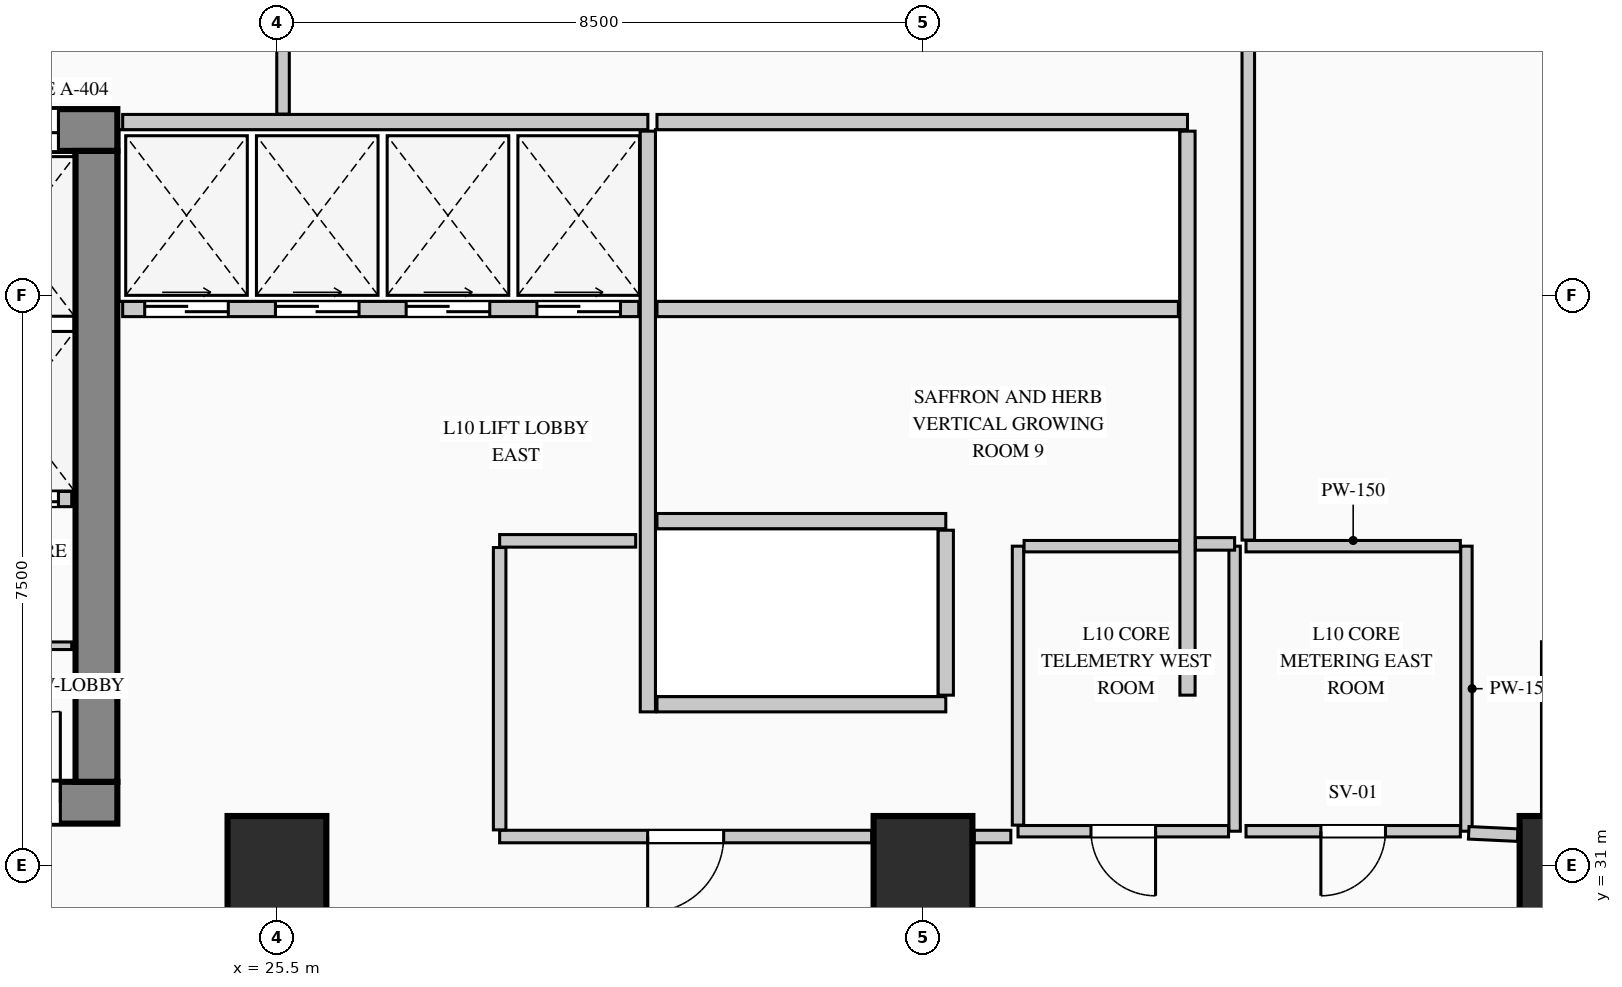
"""IFC4 building model, lengths in metres.
Left out: names, types, materials, properties, quantities, classifications, styles, units other than length and angle.
Written with IfcOpenShell. Run it as: python <this file> out.ifc"""

import sys

from ifc_helpers import new_model, si_unit, direction, frame, frame_2d, origin, origin_2d, place, context, subcontext, project, spatial, rectangle, extrude, element, fill, save


model = new_model("IFC4")
c1 = context("Model", 3, precision=1e-05, world=origin(), true_north=direction((0.0, 1.0)))
c2 = subcontext(c1, "Body", "Model", "MODEL_VIEW")
j1 = project(units=[si_unit("LENGTHUNIT", "METRE"), si_unit("PLANEANGLEUNIT", "RADIAN")], contexts=[c1])
p1 = place(None, origin())
s1 = spatial("IfcSite", under=j1, at=p1, CompositionType="ELEMENT")
p2 = place(p1, origin())
s2 = spatial("IfcBuilding", under=s1, at=p2, CompositionType="ELEMENT")
p3 = place(p2, frame((0.0, 0.0, 44.6)))
s3 = spatial("IfcBuildingStorey", under=s2, at=p3, CompositionType="ELEMENT", Elevation=44.6)
p4 = place(p3, frame((5.45, 40.675, 0.0), z_axis=(0.0, 0.0, 1.0), x_axis=(1.0, 0.0, 0.0)))
e1 = element("IfcWall", 1, at=p4, inside=s3, PredefinedType="SHEAR", context=c2, shape_type="SweptSolid", body=[
    extrude(rectangle(XDim=17.95, YDim=0.55, at=frame_2d((8.975, 0.0))), origin(), (0.0, 0.0, 1.0), 4.4),
])
p5 = place(p4, frame((15.995, 0.0, 0.0)))
e2 = element("IfcOpeningElement", 2, at=p5, cuts=e1, PredefinedType="OPENING", context=c2, shape_type="SweptSolid", body=[
    extrude(rectangle(XDim=1.18, YDim=2.25, at=frame_2d((0.59, 1.125))), frame((0.0, 0.285, 0.0), z_axis=(0.0, -1.0, 0.0), x_axis=(1.0, 0.0, 0.0)), (0.0, 0.0, 1.0), 0.57),
])
p6 = place(p3, frame((5.45, 31.825, 0.0), z_axis=(0.0, 0.0, 1.0), x_axis=(1.0, 0.0, 0.0)))
e3 = element("IfcWall", 3, at=p6, inside=s3, PredefinedType="SHEAR", context=c2, shape_type="SweptSolid", body=[
    extrude(rectangle(XDim=17.95, YDim=0.55, at=frame_2d((8.975, 0.0))), origin(), (0.0, 0.0, 1.0), 4.4),
])
p7 = place(p6, frame((3.2, 0.0, 0.0)))
e4 = element("IfcOpeningElement", 4, at=p7, cuts=e3, PredefinedType="OPENING", context=c2, shape_type="SweptSolid", body=[
    extrude(rectangle(XDim=1.2, YDim=2.2, at=frame_2d((0.6, 1.1))), frame((0.0, 0.285, 0.0), z_axis=(0.0, -1.0, 0.0), x_axis=(1.0, 0.0, 0.0)), (0.0, 0.0, 1.0), 0.57),
])
p8 = place(p6, frame((7.05, 0.0, 0.0)))
e5 = element("IfcOpeningElement", 5, at=p8, cuts=e3, PredefinedType="OPENING", context=c2, shape_type="SweptSolid", body=[
    extrude(rectangle(XDim=1.2, YDim=2.2, at=frame_2d((0.6, 1.1))), frame((0.0, 0.285, 0.0), z_axis=(0.0, -1.0, 0.0), x_axis=(1.0, 0.0, 0.0)), (0.0, 0.0, 1.0), 0.57),
])
p9 = place(p6, frame((8.9, 0.0, 0.0)))
e6 = element("IfcOpeningElement", 6, at=p9, cuts=e3, PredefinedType="OPENING", context=c2, shape_type="SweptSolid", body=[
    extrude(rectangle(XDim=1.15, YDim=2.2, at=frame_2d((0.575, 1.1))), frame((0.0, 0.285, 0.0), z_axis=(0.0, -1.0, 0.0), x_axis=(1.0, 0.0, 0.0)), (0.0, 0.0, 1.0), 0.57),
])
p10 = place(p6, frame((16.0, 0.0, 0.0)))
e7 = element("IfcOpeningElement", 7, at=p10, cuts=e3, PredefinedType="OPENING", context=c2, shape_type="SweptSolid", body=[
    extrude(rectangle(XDim=1.2, YDim=2.2, at=frame_2d((0.6, 1.1))), frame((0.0, 0.285, 0.0), z_axis=(0.0, -1.0, 0.0), x_axis=(1.0, 0.0, 0.0)), (0.0, 0.0, 1.0), 0.57),
])
p11 = place(p3, frame((23.125, 32.1, 0.0), z_axis=(0.0, 0.0, 1.0), x_axis=(0.0, 1.0, 0.0)))
e8 = element("IfcWall", 8, at=p11, inside=s3, PredefinedType="SHEAR", context=c2, shape_type="SweptSolid", body=[
    extrude(rectangle(XDim=8.3, YDim=0.55, at=frame_2d((4.15, 0.0))), origin(), (0.0, 0.0, 1.0), 4.4),
])
for number, where, z_axis, x_axis in (
    (9, (25.5, 31.0, 0.0), (0.0, 0.0, 1.0), (1.0, 0.0, 0.0)),
    (10, (34.0, 31.0, 0.0), (0.0, 0.0, 1.0), (1.0, 0.0, 0.0)),
    (11, (42.5, 31.0, 0.0), (0.0, 0.0, 1.0), (1.0, 0.0, 0.0)),
):
    element("IfcColumn", number, at=place(p3, frame(where, z_axis=z_axis, x_axis=x_axis)), inside=s3, PredefinedType="COLUMN", context=c2, shape_type="SweptSolid", body=[
        extrude(rectangle(XDim=1.3, YDim=1.3, at=origin_2d()), origin(), (0.0, 0.0, 1.0), 4.4),
    ])
p12 = place(p3, frame((21.38, 33.89, 0.0), z_axis=(0.0, 0.0, 1.0), x_axis=(1.0, 0.0, 0.0)))
e12 = element("IfcWall", 12, at=p12, inside=s3, PredefinedType="PARTITIONING", context=c2, shape_type="SweptSolid", body=[
    extrude(rectangle(XDim=1.42, YDim=0.1, at=frame_2d((0.71, 0.0))), origin(), (0.0, 0.0, 1.0), 4.1),
])
p13 = place(p12, frame((0.28, 0.0, 0.0)))
e13 = element("IfcOpeningElement", 13, at=p13, cuts=e12, PredefinedType="OPENING", context=c2, shape_type="SweptSolid", body=[
    extrude(rectangle(XDim=0.85, YDim=2.1, at=frame_2d((0.425, 1.05))), frame((0.0, 0.06, 0.0), z_axis=(0.0, -1.0, 0.0), x_axis=(1.0, 0.0, 0.0)), (0.0, 0.0, 1.0), 0.12),
])
p14 = place(p3, frame((21.3, 35.82, 0.0), z_axis=(0.0, 0.0, 1.0), x_axis=(1.0, 0.0, 0.0)))
e14 = element("IfcWall", 14, at=p14, inside=s3, PredefinedType="PARTITIONING", context=c2, shape_type="SweptSolid", body=[
    extrude(rectangle(XDim=1.5, YDim=0.2, at=frame_2d((0.75, 0.0))), origin(), (0.0, 0.0, 1.0), 4.1),
])
p15 = place(p14, frame((0.145, 0.0, 0.0)))
e15 = element("IfcOpeningElement", 15, at=p15, cuts=e14, PredefinedType="OPENING", context=c2, shape_type="SweptSolid", body=[
    extrude(rectangle(XDim=1.18, YDim=2.25, at=frame_2d((0.59, 1.125))), frame((0.0, 0.11, 0.0), z_axis=(0.0, -1.0, 0.0), x_axis=(1.0, 0.0, 0.0)), (0.0, 0.0, 1.0), 0.22),
])
p16 = place(p3, frame((23.47, 40.78, 0.0), z_axis=(0.0, 0.0, 1.0), x_axis=(1.0, 0.0, 0.0)))
e16 = element("IfcWall", 16, at=p16, inside=s3, PredefinedType="PARTITIONING", context=c2, shape_type="SweptSolid", body=[
    extrude(rectangle(XDim=6.91, YDim=0.2, at=frame_2d((3.455, 0.0))), origin(), (0.0, 0.0, 1.0), 4.1),
])
p17 = place(p3, frame((30.38, 33.02, 0.0), z_axis=(0.0, 0.0, 1.0), x_axis=(0.0, 1.0, 0.0)))
e17 = element("IfcWall", 17, at=p17, inside=s3, PredefinedType="PARTITIONING", context=c2, shape_type="SweptSolid", body=[
    extrude(rectangle(XDim=7.64, YDim=0.2, at=frame_2d((3.82, 0.0))), origin(), (0.0, 0.0, 1.0), 4.1),
])
p18 = place(p3, frame((23.47, 38.32, 0.0), z_axis=(0.0, 0.0, 1.0), x_axis=(1.0, 0.0, 0.0)))
e18 = element("IfcWall", 18, at=p18, inside=s3, PredefinedType="PARTITIONING", context=c2, shape_type="SweptSolid", body=[
    extrude(rectangle(XDim=6.79, YDim=0.2, at=frame_2d((3.395, 0.0))), origin(), (0.0, 0.0, 1.0), 4.1),
])
p19 = place(p18, frame((0.29, 0.0, 0.0)))
e19 = element("IfcOpeningElement", 19, at=p19, cuts=e18, PredefinedType="OPENING", context=c2, shape_type="SweptSolid", body=[
    extrude(rectangle(XDim=1.1, YDim=2.2, at=frame_2d((0.55, 1.1))), frame((0.0, 0.11, 0.0), z_axis=(0.0, -1.0, 0.0), x_axis=(1.0, 0.0, 0.0)), (0.0, 0.0, 1.0), 0.22),
])
p20 = place(p18, frame((2.01, 0.0, 0.0)))
e20 = element("IfcOpeningElement", 20, at=p20, cuts=e18, PredefinedType="OPENING", context=c2, shape_type="SweptSolid", body=[
    extrude(rectangle(XDim=1.1, YDim=2.2, at=frame_2d((0.55, 1.1))), frame((0.0, 0.11, 0.0), z_axis=(0.0, -1.0, 0.0), x_axis=(1.0, 0.0, 0.0)), (0.0, 0.0, 1.0), 0.22),
])
p21 = place(p18, frame((3.73, 0.0, 0.0)))
e21 = element("IfcOpeningElement", 21, at=p21, cuts=e18, PredefinedType="OPENING", context=c2, shape_type="SweptSolid", body=[
    extrude(rectangle(XDim=1.1, YDim=2.2, at=frame_2d((0.55, 1.1))), frame((0.0, 0.11, 0.0), z_axis=(0.0, -1.0, 0.0), x_axis=(1.0, 0.0, 0.0)), (0.0, 0.0, 1.0), 0.22),
])
p22 = place(p18, frame((5.45, 0.0, 0.0)))
e22 = element("IfcOpeningElement", 22, at=p22, cuts=e18, PredefinedType="OPENING", context=c2, shape_type="SweptSolid", body=[
    extrude(rectangle(XDim=1.1, YDim=2.2, at=frame_2d((0.55, 1.1))), frame((0.0, 0.11, 0.0), z_axis=(0.0, -1.0, 0.0), x_axis=(1.0, 0.0, 0.0)), (0.0, 0.0, 1.0), 0.22),
])
p23 = place(p3, frame((30.5, 40.78, 0.0), z_axis=(0.0, 0.0, 1.0), x_axis=(1.0, 0.0, 0.0)))
e23 = element("IfcWall", 23, at=p23, inside=s3, PredefinedType="PARTITIONING", context=c2, shape_type="SweptSolid", body=[
    extrude(rectangle(XDim=6.98, YDim=0.2, at=frame_2d((3.49, 0.0))), origin(), (0.0, 0.0, 1.0), 4.1),
])
p24 = place(p3, frame((37.48, 33.24, 0.0), z_axis=(0.0, 0.0, 1.0), x_axis=(0.0, 1.0, 0.0)))
e24 = element("IfcWall", 24, at=p24, inside=s3, PredefinedType="PARTITIONING", context=c2, shape_type="SweptSolid", body=[
    extrude(rectangle(XDim=7.42, YDim=0.2, at=frame_2d((3.71, 0.0))), origin(), (0.0, 0.0, 1.0), 4.1),
])
p25 = place(p3, frame((30.5, 38.32, 0.0), z_axis=(0.0, 0.0, 1.0), x_axis=(1.0, 0.0, 0.0)))
e25 = element("IfcWall", 25, at=p25, inside=s3, PredefinedType="PARTITIONING", context=c2, shape_type="SweptSolid", body=[
    extrude(rectangle(XDim=6.86, YDim=0.2, at=frame_2d((3.43, 0.0))), origin(), (0.0, 0.0, 1.0), 4.1),
])
for number, where, z_axis, x_axis in (
    (26, (30.5, 35.53, 0.0), (0.0, 0.0, 1.0), (1.0, 0.0, 0.0)),
    (27, (30.5, 33.12, 0.0), (0.0, 0.0, 1.0), (1.0, 0.0, 0.0)),
):
    element("IfcWall", number, at=place(p3, frame(where, z_axis=z_axis, x_axis=x_axis)), inside=s3, PredefinedType="PARTITIONING", context=c2, shape_type="SweptSolid", body=[
        extrude(rectangle(XDim=3.8, YDim=0.2, at=frame_2d((1.9, 0.0))), origin(), (0.0, 0.0, 1.0), 4.1),
    ])
p26 = place(p3, frame((34.3, 33.24, 0.0), z_axis=(0.0, 0.0, 1.0), x_axis=(0.0, 1.0, 0.0)))
e28 = element("IfcWall", 28, at=p26, inside=s3, PredefinedType="PARTITIONING", context=c2, shape_type="SweptSolid", body=[
    extrude(rectangle(XDim=2.17, YDim=0.2, at=frame_2d((1.085, 0.0))), origin(), (0.0, 0.0, 1.0), 4.1),
])
p27 = place(p3, frame((38.1, 35.2, 0.0), z_axis=(0.0, 0.0, 1.0), x_axis=(0.0, -1.0, 0.0)))
e29 = element("IfcWall", 29, at=p27, inside=s3, PredefinedType="PARTITIONING", context=c2, shape_type="SweptSolid", body=[
    extrude(rectangle(XDim=3.75, YDim=0.15, at=frame_2d((1.875, 0.0))), origin(), (0.0, 0.0, 1.0), 4.1),
])
p28 = place(p3, frame((38.02, 31.45, 0.0), z_axis=(0.0, 0.0, 1.0), x_axis=(-1.0, 0.0, 0.0)))
e30 = element("IfcWall", 30, at=p28, inside=s3, PredefinedType="PARTITIONING", context=c2, shape_type="SweptSolid", body=[
    extrude(rectangle(XDim=2.77, YDim=0.15, at=frame_2d((1.385, 0.0))), origin(), (0.0, 0.0, 1.0), 4.1),
])
p29 = place(p28, frame((0.96, 0.0, 0.0)))
e31 = element("IfcOpeningElement", 31, at=p29, cuts=e30, PredefinedType="OPENING", context=c2, shape_type="SweptSolid", body=[
    extrude(rectangle(XDim=0.85, YDim=2.1, at=frame_2d((0.425, 1.05))), frame((0.0, 0.085, 0.0), z_axis=(0.0, -1.0, 0.0), x_axis=(1.0, 0.0, 0.0)), (0.0, 0.0, 1.0), 0.17),
])
p30 = place(p3, frame((35.25, 31.53, 0.0), z_axis=(0.0, 0.0, 1.0), x_axis=(0.0, 1.0, 0.0)))
e32 = element("IfcWall", 32, at=p30, inside=s3, PredefinedType="PARTITIONING", context=c2, shape_type="SweptSolid", body=[
    extrude(rectangle(XDim=3.67, YDim=0.15, at=frame_2d((1.835, 0.0))), origin(), (0.0, 0.0, 1.0), 4.1),
])
p31 = place(p3, frame((35.33, 35.2, 0.0), z_axis=(0.0, 0.0, 1.0), x_axis=(1.0, 0.0, 0.0)))
e33 = element("IfcWall", 33, at=p31, inside=s3, PredefinedType="PARTITIONING", context=c2, shape_type="SweptSolid", body=[
    extrude(rectangle(XDim=2.045, YDim=0.15, at=frame_2d((1.022, 0.0))), origin(), (0.0, 0.0, 1.0), 4.1),
])
p32 = place(p3, frame((41.15, 35.2, 0.0), z_axis=(0.0, 0.0, 1.0), x_axis=(0.0, -1.0, 0.0)))
e34 = element("IfcWall", 34, at=p32, inside=s3, PredefinedType="PARTITIONING", context=c2, shape_type="SweptSolid", body=[
    extrude(rectangle(XDim=3.75, YDim=0.15, at=frame_2d((1.875, 0.0))), origin(), (0.0, 0.0, 1.0), 4.1),
])
p33 = place(p3, frame((41.07, 31.45, 0.0), z_axis=(0.0, 0.0, 1.0), x_axis=(-1.0, 0.0, 0.0)))
e35 = element("IfcWall", 35, at=p33, inside=s3, PredefinedType="PARTITIONING", context=c2, shape_type="SweptSolid", body=[
    extrude(rectangle(XDim=2.82, YDim=0.15, at=frame_2d((1.41, 0.0))), origin(), (0.0, 0.0, 1.0), 4.1),
])
p34 = place(p33, frame((0.985, 0.0, 0.0)))
e36 = element("IfcOpeningElement", 36, at=p34, cuts=e35, PredefinedType="OPENING", context=c2, shape_type="SweptSolid", body=[
    extrude(rectangle(XDim=0.85, YDim=2.1, at=frame_2d((0.425, 1.05))), frame((0.0, 0.085, 0.0), z_axis=(0.0, -1.0, 0.0), x_axis=(1.0, 0.0, 0.0)), (0.0, 0.0, 1.0), 0.17),
])
p35 = place(p3, frame((38.25, 35.2, 0.0), z_axis=(0.0, 0.0, 1.0), x_axis=(1.0, 0.0, 0.0)))
e37 = element("IfcWall", 37, at=p35, inside=s3, PredefinedType="PARTITIONING", context=c2, shape_type="SweptSolid", body=[
    extrude(rectangle(XDim=2.82, YDim=0.15, at=frame_2d((1.41, 0.0))), origin(), (0.0, 0.0, 1.0), 4.1),
])
p36 = place(p3, frame((38.28, 35.28, 0.0), z_axis=(0.0, 0.0, 1.0), x_axis=(0.0, 1.0, 0.0)))
e38 = element("IfcWall", 38, at=p36, inside=s3, PredefinedType="PARTITIONING", context=c2, shape_type="SweptSolid", body=[
    extrude(rectangle(XDim=7.935, YDim=0.165, at=frame_2d((3.968, 0.0))), origin(), (0.0, 0.0, 1.0), 4.1),
])
p37 = place(p3, frame((42.22, 33.942, 0.0), z_axis=(0.0, 0.0, 1.0), x_axis=(0.0, -1.0, 0.0)))
e39 = element("IfcWall", 39, at=p37, inside=s3, PredefinedType="PARTITIONING", context=c2, shape_type="SweptSolid", body=[
    extrude(rectangle(XDim=2.267, YDim=0.165, at=frame_2d((1.134, 0.0))), origin(), (0.0, 0.0, 1.0), 4.1),
])
p38 = place(p3, frame((41.825, 31.398, 0.0), z_axis=(0.0, 0.0, 1.0), x_axis=(-0.998882632516, 0.04725977633, 0.0)))
e40 = element("IfcWall", 40, at=p38, inside=s3, PredefinedType="PARTITIONING", context=c2, shape_type="SweptSolid", body=[
    extrude(rectangle(XDim=0.646, YDim=0.165, at=frame_2d((0.323, 0.0))), origin(), (0.0, 0.0, 1.0), 4.1),
])
p39 = place(p3, frame((28.43, 35.27, 0.0), z_axis=(0.0, 0.0, 1.0), x_axis=(1.0, 0.0, 0.0)))
e41 = element("IfcWall", 41, at=p39, inside=s3, PredefinedType="PARTITIONING", context=c2, shape_type="SweptSolid", body=[
    extrude(rectangle(XDim=1.79, YDim=0.165, at=frame_2d((0.895, 0.0))), origin(), (0.0, 0.0, 1.0), 4.1),
])
p40 = place(p3, frame((25.58, 40.885, 0.0), z_axis=(0.0, 0.0, 1.0), x_axis=(0.0, 1.0, 0.0)))
e42 = element("IfcWall", 42, at=p40, inside=s3, PredefinedType="PARTITIONING", context=c2, shape_type="SweptSolid", body=[
    extrude(rectangle(XDim=2.33, YDim=0.165, at=frame_2d((1.165, 0.0))), origin(), (0.0, 0.0, 1.0), 4.1),
])
p41 = place(p3, frame((38.1, 35.23, 0.0), z_axis=(0.0, 0.0, 1.0), x_axis=(-1.0, 0.0, 0.0)))
e43 = element("IfcWall", 43, at=p41, inside=s3, PredefinedType="PARTITIONING", context=c2, shape_type="SweptSolid", body=[
    extrude(rectangle(XDim=0.515, YDim=0.165, at=frame_2d((0.258, 0.0))), origin(), (0.0, 0.0, 1.0), 4.1),
])
p42 = place(p3, frame((35.156, 31.38, 0.0), z_axis=(0.0, 0.0, 1.0), x_axis=(-1.0, 0.0, 0.0)))
e44 = element("IfcWall", 44, at=p42, inside=s3, PredefinedType="PARTITIONING", context=c2, shape_type="SweptSolid", body=[
    extrude(rectangle(XDim=0.48, YDim=0.165, at=frame_2d((0.24, 0.0))), origin(), (0.0, 0.0, 1.0), 4.1),
])
p43 = place(p3, frame((33.325, 31.38, 0.0), z_axis=(0.0, 0.0, 1.0), x_axis=(-1.0, 0.0, 0.0)))
e45 = element("IfcWall", 45, at=p43, inside=s3, PredefinedType="PARTITIONING", context=c2, shape_type="SweptSolid", body=[
    extrude(rectangle(XDim=4.895, YDim=0.165, at=frame_2d((2.448, 0.0))), origin(), (0.0, 0.0, 1.0), 4.1),
])
p44 = place(p43, frame((1.948, 0.0, 0.0)))
e46 = element("IfcOpeningElement", 46, at=p44, cuts=e45, PredefinedType="OPENING", context=c2, shape_type="SweptSolid", body=[
    extrude(rectangle(XDim=1.0, YDim=2.15, at=frame_2d((0.5, 1.075))), frame((0.0, 0.093, 0.0), z_axis=(0.0, -1.0, 0.0), x_axis=(1.0, 0.0, 0.0)), (0.0, 0.0, 1.0), 0.185),
])
p45 = place(p3, frame((28.43, 31.468, 0.0), z_axis=(0.0, 0.0, 1.0), x_axis=(0.0, 1.0, 0.0)))
e47 = element("IfcWall", 47, at=p45, inside=s3, PredefinedType="PARTITIONING", context=c2, shape_type="SweptSolid", body=[
    extrude(rectangle(XDim=3.715, YDim=0.165, at=frame_2d((1.857, 0.0))), origin(), (0.0, 0.0, 1.0), 4.1),
])
p46 = place(p10, origin())
e48 = element("IfcDoor", 48, at=p46, inside=s3, OperationType="SINGLE_SWING_RIGHT", PredefinedType="DOOR", context=c2, shape_type="SweptSolid", body=[
    extrude(rectangle(XDim=1.2, YDim=2.2, at=frame_2d((0.6, 1.1))), frame((0.0, 0.025, 0.0), z_axis=(0.0, -1.0, 0.0), x_axis=(1.0, 0.0, 0.0)), (0.0, 0.0, 1.0), 0.05),
])
fill(e7, e48)
p47 = place(p5, origin())
e49 = element("IfcDoor", 49, at=p47, inside=s3, OperationType="DOUBLE_DOOR_SLIDING", PredefinedType="DOOR", context=c2, shape_type="SweptSolid", body=[
    extrude(rectangle(XDim=1.18, YDim=2.25, at=frame_2d((0.59, 1.125))), frame((0.0, 0.025, 0.0), z_axis=(0.0, -1.0, 0.0), x_axis=(1.0, 0.0, 0.0)), (0.0, 0.0, 1.0), 0.05),
])
fill(e2, e49)
p48 = place(p15, origin())
e50 = element("IfcDoor", 50, at=p48, inside=s3, OperationType="DOUBLE_DOOR_SLIDING", PredefinedType="DOOR", context=c2, shape_type="SweptSolid", body=[
    extrude(rectangle(XDim=1.18, YDim=2.25, at=frame_2d((0.59, 1.125))), frame((0.0, 0.025, 0.0), z_axis=(0.0, -1.0, 0.0), x_axis=(1.0, 0.0, 0.0)), (0.0, 0.0, 1.0), 0.05),
])
fill(e15, e50)
p49 = place(p19, origin())
e51 = element("IfcDoor", 51, at=p49, inside=s3, OperationType="DOUBLE_DOOR_SLIDING", PredefinedType="DOOR", context=c2, shape_type="SweptSolid", body=[
    extrude(rectangle(XDim=1.1, YDim=2.2, at=frame_2d((0.55, 1.1))), frame((0.0, 0.025, 0.0), z_axis=(0.0, -1.0, 0.0), x_axis=(1.0, 0.0, 0.0)), (0.0, 0.0, 1.0), 0.05),
])
fill(e19, e51)
p50 = place(p20, origin())
e52 = element("IfcDoor", 52, at=p50, inside=s3, OperationType="DOUBLE_DOOR_SLIDING", PredefinedType="DOOR", context=c2, shape_type="SweptSolid", body=[
    extrude(rectangle(XDim=1.1, YDim=2.2, at=frame_2d((0.55, 1.1))), frame((0.0, 0.025, 0.0), z_axis=(0.0, -1.0, 0.0), x_axis=(1.0, 0.0, 0.0)), (0.0, 0.0, 1.0), 0.05),
])
fill(e20, e52)
p51 = place(p21, origin())
e53 = element("IfcDoor", 53, at=p51, inside=s3, OperationType="DOUBLE_DOOR_SLIDING", PredefinedType="DOOR", context=c2, shape_type="SweptSolid", body=[
    extrude(rectangle(XDim=1.1, YDim=2.2, at=frame_2d((0.55, 1.1))), frame((0.0, 0.025, 0.0), z_axis=(0.0, -1.0, 0.0), x_axis=(1.0, 0.0, 0.0)), (0.0, 0.0, 1.0), 0.05),
])
fill(e21, e53)
p52 = place(p22, origin())
e54 = element("IfcDoor", 54, at=p52, inside=s3, OperationType="DOUBLE_DOOR_SLIDING", PredefinedType="DOOR", context=c2, shape_type="SweptSolid", body=[
    extrude(rectangle(XDim=1.1, YDim=2.2, at=frame_2d((0.55, 1.1))), frame((0.0, 0.025, 0.0), z_axis=(0.0, -1.0, 0.0), x_axis=(1.0, 0.0, 0.0)), (0.0, 0.0, 1.0), 0.05),
])
fill(e22, e54)
p53 = place(p29, origin())
e55 = element("IfcDoor", 55, at=p53, inside=s3, OperationType="SINGLE_SWING_LEFT", PredefinedType="DOOR", context=c2, shape_type="SweptSolid", body=[
    extrude(rectangle(XDim=0.85, YDim=2.1, at=frame_2d((0.425, 1.05))), frame((0.0, 0.025, 0.0), z_axis=(0.0, -1.0, 0.0), x_axis=(1.0, 0.0, 0.0)), (0.0, 0.0, 1.0), 0.05),
])
fill(e31, e55)
p54 = place(p34, origin())
e56 = element("IfcDoor", 56, at=p54, inside=s3, OperationType="SINGLE_SWING_RIGHT", PredefinedType="DOOR", context=c2, shape_type="SweptSolid", body=[
    extrude(rectangle(XDim=0.85, YDim=2.1, at=frame_2d((0.425, 1.05))), frame((0.0, 0.025, 0.0), z_axis=(0.0, -1.0, 0.0), x_axis=(1.0, 0.0, 0.0)), (0.0, 0.0, 1.0), 0.05),
])
fill(e36, e56)
p55 = place(p44, origin())
e57 = element("IfcDoor", 57, at=p55, inside=s3, OperationType="SINGLE_SWING_RIGHT", PredefinedType="DOOR", context=c2, shape_type="SweptSolid", body=[
    extrude(rectangle(XDim=1.0, YDim=2.15, at=frame_2d((0.5, 1.075))), frame((0.0, 0.025, 0.0), z_axis=(0.0, -1.0, 0.0), x_axis=(1.0, 0.0, 0.0)), (0.0, 0.0, 1.0), 0.05),
])
fill(e46, e57)
save(model, sys.argv[1])
